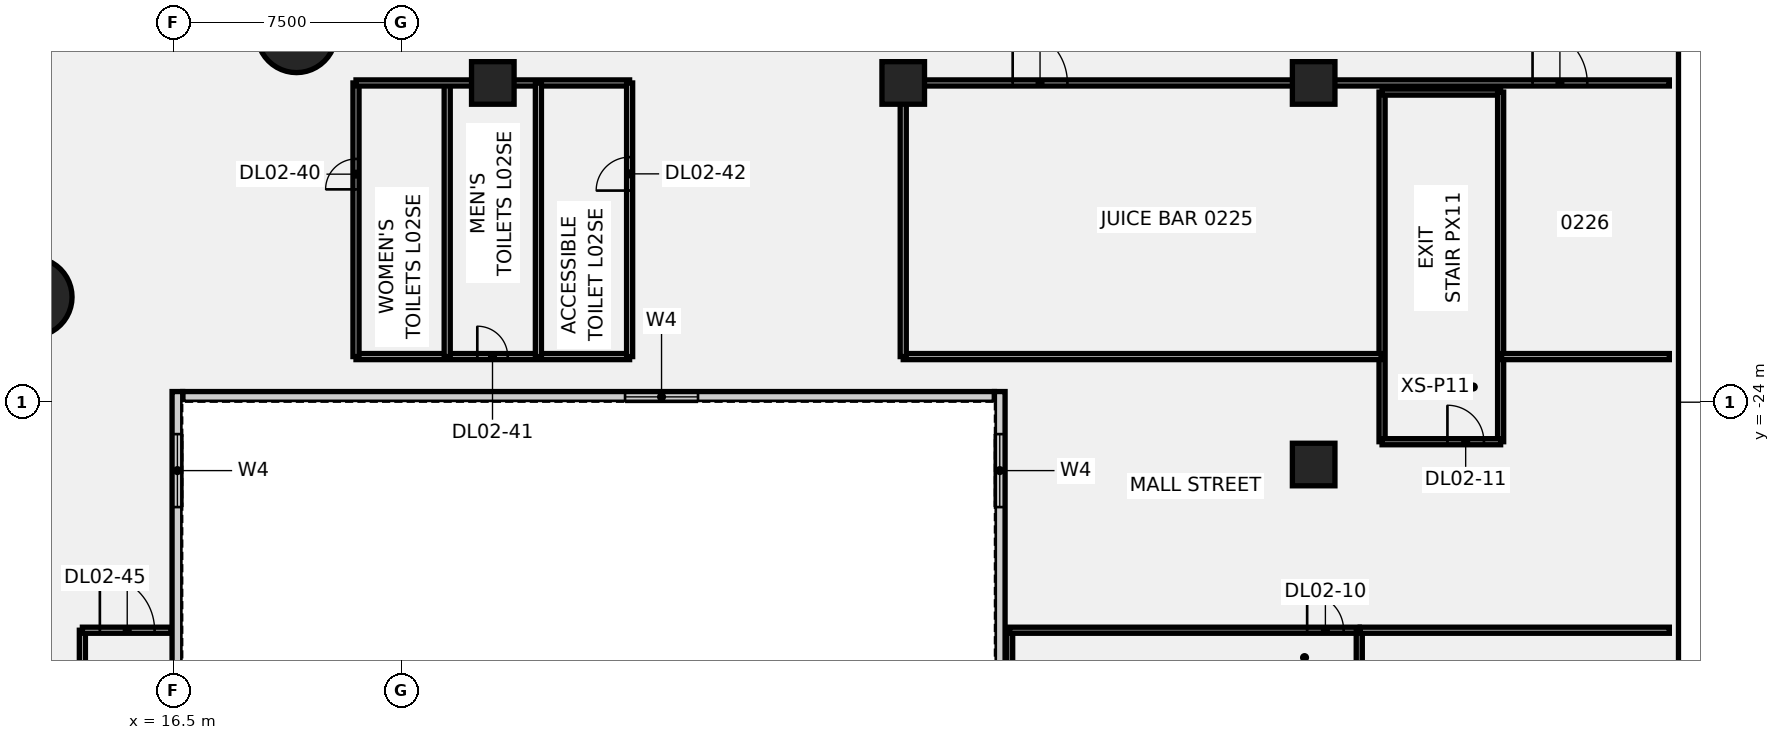
"""IFC4 building model, lengths in metres.
Left out: names, types, materials, properties, quantities, classifications, styles, units other than length and angle.
Written with IfcOpenShell. Run it as: python <this file> out.ifc"""

import sys

from ifc_helpers import new_model, si_unit, direction, frame, frame_2d, origin, origin_2d, place, context, subcontext, project, spatial, rectangle, circle, extrude, element, fill, save


model = new_model("IFC4")
c1 = context("Model", 3, precision=1e-05, world=origin(), true_north=direction((0.0, 1.0)))
c2 = subcontext(c1, "Body", "Model", "MODEL_VIEW")
j1 = project(units=[si_unit("LENGTHUNIT", "METRE"), si_unit("PLANEANGLEUNIT", "RADIAN")], contexts=[c1])
p1 = place(None, origin())
s1 = spatial("IfcSite", under=j1, at=p1, CompositionType="ELEMENT")
p2 = place(p1, origin())
s2 = spatial("IfcBuilding", under=s1, at=p2, CompositionType="ELEMENT")
p3 = place(p2, frame((0.0, 0.0, 15.0)))
s3 = spatial("IfcBuildingStorey", under=s2, at=p3, CompositionType="ELEMENT", Elevation=15.0)
for number, where, z_axis, x_axis in (
    (1, (11.86, -20.543, -0.5), (0.0, 0.0, 1.0), (1.0, 0.0, 0.0)),
    (2, (20.543, -11.86, -0.5), (0.0, 0.0, 1.0), (1.0, 0.0, 0.0)),
):
    element("IfcColumn", number, at=place(p3, frame(where, z_axis=z_axis, x_axis=x_axis)), inside=s3, PredefinedType="COLUMN", context=c2, shape_type="SweptSolid", body=[
        extrude(circle(Radius=1.3, at=origin_2d()), origin(), (0.0, 0.0, 1.0), 5.0),
    ])
for number, where, z_axis, x_axis in (
    (3, (27.0, -13.5, -0.5), (0.0, 0.0, 1.0), (1.0, 0.0, 0.0)),
    (4, (40.5, -13.5, -0.5), (0.0, 0.0, 1.0), (1.0, 0.0, 0.0)),
    (5, (54.0, -26.05, -0.5), (0.0, 0.0, 1.0), (1.0, 0.0, 0.0)),
    (6, (54.0, -13.5, -0.5), (0.0, 0.0, 1.0), (1.0, 0.0, 0.0)),
):
    element("IfcColumn", number, at=place(p3, frame(where, z_axis=z_axis, x_axis=x_axis)), inside=s3, PredefinedType="COLUMN", context=c2, shape_type="SweptSolid", body=[
        extrude(rectangle(XDim=1.4, YDim=1.4, at=origin_2d()), origin(), (0.0, 0.0, 1.0), 5.0),
    ])
p4 = place(p3, frame((44.0, -35.4, 0.0), z_axis=(0.0, 0.0, 1.0), x_axis=(0.0, 1.0, 0.0)))
e7 = element("IfcWall", 7, at=p4, inside=s3, PredefinedType="PARTITIONING", context=c2, shape_type="SweptSolid", body=[
    extrude(rectangle(XDim=3.9, YDim=0.2, at=frame_2d((1.95, 0.0))), origin(), (0.0, 0.0, 1.0), 4.5),
])
p5 = place(p3, frame((44.0, -31.5, 0.0), z_axis=(0.0, 0.0, 1.0), x_axis=(1.0, 0.0, 0.0)))
e8 = element("IfcWall", 8, at=p5, inside=s3, PredefinedType="PARTITIONING", context=c2, shape_type="SweptSolid", body=[
    extrude(rectangle(XDim=11.5, YDim=0.2, at=frame_2d((5.75, 0.0))), origin(), (0.0, 0.0, 1.0), 4.5),
])
p6 = place(p5, frame((9.786, 0.0, 0.0)))
e9 = element("IfcOpeningElement", 9, at=p6, cuts=e8, PredefinedType="OPENING", context=c2, shape_type="SweptSolid", body=[
    extrude(rectangle(XDim=1.2, YDim=2.1, at=frame_2d((0.6, 1.05))), frame((0.0, 0.11, 0.0), z_axis=(0.0, -1.0, 0.0), x_axis=(1.0, 0.0, 0.0)), (0.0, 0.0, 1.0), 0.22),
])
p7 = place(p3, frame((55.5, -35.4, 0.0), z_axis=(0.0, 0.0, 1.0), x_axis=(0.0, 1.0, 0.0)))
e10 = element("IfcWall", 10, at=p7, inside=s3, PredefinedType="PARTITIONING", context=c2, shape_type="SweptSolid", body=[
    extrude(rectangle(XDim=3.9, YDim=0.2, at=frame_2d((1.95, 0.0))), origin(), (0.0, 0.0, 1.0), 4.5),
])
p8 = place(p3, frame((56.25, -25.3, 0.0), z_axis=(0.0, 0.0, 1.0), x_axis=(0.0, 1.0, 0.0)))
e11 = element("IfcWall", 11, at=p8, inside=s3, PredefinedType="PARTITIONING", context=c2, shape_type="SweptSolid", body=[
    extrude(rectangle(XDim=11.5, YDim=0.2, at=frame_2d((5.75, 0.0))), origin(), (0.0, 0.0, 1.0), 4.5),
])
p9 = place(p3, frame((56.25, -13.8, 0.0), z_axis=(0.0, 0.0, 1.0), x_axis=(1.0, 0.0, 0.0)))
e12 = element("IfcWall", 12, at=p9, inside=s3, PredefinedType="PARTITIONING", context=c2, shape_type="SweptSolid", body=[
    extrude(rectangle(XDim=3.9, YDim=0.2, at=frame_2d((1.95, 0.0))), origin(), (0.0, 0.0, 1.0), 4.5),
])
p10 = place(p3, frame((60.15, -25.3, 0.0), z_axis=(0.0, 0.0, 1.0), x_axis=(0.0, 1.0, 0.0)))
e13 = element("IfcWall", 13, at=p10, inside=s3, PredefinedType="PARTITIONING", context=c2, shape_type="SweptSolid", body=[
    extrude(rectangle(XDim=11.5, YDim=0.2, at=frame_2d((5.75, 0.0))), origin(), (0.0, 0.0, 1.0), 4.5),
])
p11 = place(p3, frame((56.25, -25.3, 0.0), z_axis=(0.0, 0.0, 1.0), x_axis=(1.0, 0.0, 0.0)))
e14 = element("IfcWall", 14, at=p11, inside=s3, PredefinedType="PARTITIONING", context=c2, shape_type="SweptSolid", body=[
    extrude(rectangle(XDim=3.9, YDim=0.2, at=frame_2d((1.95, 0.0))), origin(), (0.0, 0.0, 1.0), 4.5),
])
p12 = place(p11, frame((2.15, 0.0, 0.0)))
e15 = element("IfcOpeningElement", 15, at=p12, cuts=e14, PredefinedType="OPENING", context=c2, shape_type="SweptSolid", body=[
    extrude(rectangle(XDim=1.2, YDim=2.1, at=frame_2d((0.6, 1.05))), frame((0.0, 0.11, 0.0), z_axis=(0.0, -1.0, 0.0), x_axis=(1.0, 0.0, 0.0)), (0.0, 0.0, 1.0), 0.22),
])
p13 = place(p3, frame((13.5, -34.22, 0.0), z_axis=(0.0, 0.0, 1.0), x_axis=(0.0, 1.0, 0.0)))
e16 = element("IfcWall", 16, at=p13, inside=s3, PredefinedType="PARTITIONING", context=c2, shape_type="SweptSolid", body=[
    extrude(rectangle(XDim=2.72, YDim=0.2, at=frame_2d((1.36, 0.0))), origin(), (0.0, 0.0, 1.0), 4.5),
])
p14 = place(p3, frame((13.5, -31.5, 0.0), z_axis=(0.0, 0.0, 1.0), x_axis=(1.0, 0.0, 0.0)))
e17 = element("IfcWall", 17, at=p14, inside=s3, PredefinedType="PARTITIONING", context=c2, shape_type="SweptSolid", body=[
    extrude(rectangle(XDim=2.92, YDim=0.2, at=frame_2d((1.46, 0.0))), origin(), (0.0, 0.0, 1.0), 4.5),
])
p15 = place(p14, frame((0.575, 0.0, 0.0)))
e18 = element("IfcOpeningElement", 18, at=p15, cuts=e17, PredefinedType="OPENING", context=c2, shape_type="SweptSolid", body=[
    extrude(rectangle(XDim=1.8, YDim=2.1, at=frame_2d((0.9, 1.05))), frame((0.0, 0.11, 0.0), z_axis=(0.0, -1.0, 0.0), x_axis=(1.0, 0.0, 0.0)), (0.0, 0.0, 1.0), 0.22),
])
p16 = place(p3, frame((22.5, -22.5, 0.0), z_axis=(0.0, 0.0, 1.0), x_axis=(1.0, 0.0, 0.0)))
e19 = element("IfcWall", 19, at=p16, inside=s3, PredefinedType="PARTITIONING", context=c2, shape_type="SweptSolid", body=[
    extrude(rectangle(XDim=9.0, YDim=0.2, at=frame_2d((4.5, 0.0))), origin(), (0.0, 0.0, 1.0), 4.5),
])
p17 = place(p16, frame((3.99, 0.0, 0.0)))
e20 = element("IfcOpeningElement", 20, at=p17, cuts=e19, PredefinedType="OPENING", context=c2, shape_type="SweptSolid", body=[
    extrude(rectangle(XDim=1.0, YDim=2.1, at=frame_2d((0.5, 1.05))), frame((0.0, 0.11, 0.0), z_axis=(0.0, -1.0, 0.0), x_axis=(1.0, 0.0, 0.0)), (0.0, 0.0, 1.0), 0.22),
])
p18 = place(p3, frame((25.5, -22.5, 0.0), z_axis=(0.0, 0.0, 1.0), x_axis=(0.0, 1.0, 0.0)))
e21 = element("IfcWall", 21, at=p18, inside=s3, PredefinedType="PARTITIONING", context=c2, shape_type="SweptSolid", body=[
    extrude(rectangle(XDim=9.0, YDim=0.2, at=frame_2d((4.5, 0.0))), origin(), (0.0, 0.0, 1.0), 4.5),
])
p19 = place(p3, frame((22.5, -22.5, 0.0), z_axis=(0.0, 0.0, 1.0), x_axis=(0.0, 1.0, 0.0)))
e22 = element("IfcWall", 22, at=p19, inside=s3, PredefinedType="PARTITIONING", context=c2, shape_type="SweptSolid", body=[
    extrude(rectangle(XDim=9.0, YDim=0.2, at=frame_2d((4.5, 0.0))), origin(), (0.0, 0.0, 1.0), 4.5),
])
p20 = place(p19, frame((5.5, 0.0, 0.0)))
e23 = element("IfcOpeningElement", 23, at=p20, cuts=e22, PredefinedType="OPENING", context=c2, shape_type="SweptSolid", body=[
    extrude(rectangle(XDim=1.0, YDim=2.1, at=frame_2d((0.5, 1.05))), frame((0.0, 0.11, 0.0), z_axis=(0.0, -1.0, 0.0), x_axis=(1.0, 0.0, 0.0)), (0.0, 0.0, 1.0), 0.22),
])
p21 = place(p3, frame((22.5, -13.5, 0.0), z_axis=(0.0, 0.0, 1.0), x_axis=(1.0, 0.0, 0.0)))
e24 = element("IfcWall", 24, at=p21, inside=s3, PredefinedType="PARTITIONING", context=c2, shape_type="SweptSolid", body=[
    extrude(rectangle(XDim=9.0, YDim=0.2, at=frame_2d((4.5, 0.0))), origin(), (0.0, 0.0, 1.0), 4.5),
])
p22 = place(p3, frame((31.5, -22.5, 0.0), z_axis=(0.0, 0.0, 1.0), x_axis=(0.0, 1.0, 0.0)))
e25 = element("IfcWall", 25, at=p22, inside=s3, PredefinedType="PARTITIONING", context=c2, shape_type="SweptSolid", body=[
    extrude(rectangle(XDim=9.0, YDim=0.2, at=frame_2d((4.5, 0.0))), origin(), (0.0, 0.0, 1.0), 4.5),
])
p23 = place(p22, frame((5.46, 0.0, 0.0)))
e26 = element("IfcOpeningElement", 26, at=p23, cuts=e25, PredefinedType="OPENING", context=c2, shape_type="SweptSolid", body=[
    extrude(rectangle(XDim=1.1, YDim=2.1, at=frame_2d((0.55, 1.05))), frame((0.0, 0.11, 0.0), z_axis=(0.0, -1.0, 0.0), x_axis=(1.0, 0.0, 0.0)), (0.0, 0.0, 1.0), 0.22),
])
p24 = place(p3, frame((28.5, -22.5, 0.0), z_axis=(0.0, 0.0, 1.0), x_axis=(0.0, 1.0, 0.0)))
e27 = element("IfcWall", 27, at=p24, inside=s3, PredefinedType="PARTITIONING", context=c2, shape_type="SweptSolid", body=[
    extrude(rectangle(XDim=9.0, YDim=0.2, at=frame_2d((4.5, 0.0))), origin(), (0.0, 0.0, 1.0), 4.5),
])
p25 = place(p3, frame((55.53, -31.5, 0.0), z_axis=(0.0, 0.0, 1.0), x_axis=(1.0, 0.0, 0.0)))
e28 = element("IfcWall", 28, at=p25, inside=s3, PredefinedType="PARTITIONING", context=c2, shape_type="SweptSolid", body=[
    extrude(rectangle(XDim=10.169, YDim=0.2, at=frame_2d((5.084, 0.0))), origin(), (0.0, 0.0, 1.0), 4.5),
])
p26 = place(p3, frame((40.5, -22.5, 0.0), z_axis=(0.0, 0.0, 1.0), x_axis=(1.0, 0.0, 0.0)))
e29 = element("IfcWall", 29, at=p26, inside=s3, PredefinedType="PARTITIONING", context=c2, shape_type="SweptSolid", body=[
    extrude(rectangle(XDim=15.72, YDim=0.2, at=frame_2d((7.86, 0.0))), origin(), (0.0, 0.0, 1.0), 4.5),
])
p27 = place(p3, frame((40.5, -22.5, 0.0), z_axis=(0.0, 0.0, 1.0), x_axis=(0.0, 1.0, 0.0)))
e30 = element("IfcWall", 30, at=p27, inside=s3, PredefinedType="PARTITIONING", context=c2, shape_type="SweptSolid", body=[
    extrude(rectangle(XDim=9.0, YDim=0.2, at=frame_2d((4.5, 0.0))), origin(), (0.0, 0.0, 1.0), 4.5),
])
p28 = place(p3, frame((40.5, -13.5, 0.0), z_axis=(0.0, 0.0, 1.0), x_axis=(1.0, 0.0, 0.0)))
e31 = element("IfcWall", 31, at=p28, inside=s3, PredefinedType="PARTITIONING", context=c2, shape_type="SweptSolid", body=[
    extrude(rectangle(XDim=25.199, YDim=0.2, at=frame_2d((12.6, 0.0))), origin(), (0.0, 0.0, 1.0), 4.5),
])
p29 = place(p28, frame((3.6, 0.0, 0.0)))
e32 = element("IfcOpeningElement", 32, at=p29, cuts=e31, PredefinedType="OPENING", context=c2, shape_type="SweptSolid", body=[
    extrude(rectangle(XDim=1.8, YDim=2.1, at=frame_2d((0.9, 1.05))), frame((0.0, 0.11, 0.0), z_axis=(0.0, -1.0, 0.0), x_axis=(1.0, 0.0, 0.0)), (0.0, 0.0, 1.0), 0.22),
])
p30 = place(p28, frame((20.7, 0.0, 0.0)))
e33 = element("IfcOpeningElement", 33, at=p30, cuts=e31, PredefinedType="OPENING", context=c2, shape_type="SweptSolid", body=[
    extrude(rectangle(XDim=1.8, YDim=2.1, at=frame_2d((0.9, 1.05))), frame((0.0, 0.11, 0.0), z_axis=(0.0, -1.0, 0.0), x_axis=(1.0, 0.0, 0.0)), (0.0, 0.0, 1.0), 0.22),
])
p31 = place(p3, frame((60.18, -22.5, 0.0), z_axis=(0.0, 0.0, 1.0), x_axis=(1.0, 0.0, 0.0)))
e34 = element("IfcWall", 34, at=p31, inside=s3, PredefinedType="PARTITIONING", context=c2, shape_type="SweptSolid", body=[
    extrude(rectangle(XDim=5.519, YDim=0.2, at=frame_2d((2.76, 0.0))), origin(), (0.0, 0.0, 1.0), 4.5),
])
p32 = place(p3, frame((16.8, -23.825, 0.0), z_axis=(0.0, 0.0, 1.0), x_axis=(1.0, 0.0, 0.0)))
e35 = element("IfcWall", 35, at=p32, inside=s3, PredefinedType="SOLIDWALL", context=c2, shape_type="SweptSolid", body=[
    extrude(rectangle(XDim=26.7, YDim=0.35, at=frame_2d((13.35, 0.0))), origin(), (0.0, 0.0, 1.0), 4.5),
])
p33 = place(p32, frame((14.55, 0.0, 1.0)))
e36 = element("IfcOpeningElement", 36, at=p33, cuts=e35, PredefinedType="OPENING", context=c2, shape_type="SweptSolid", body=[
    extrude(rectangle(XDim=2.4, YDim=1.8, at=frame_2d((1.2, 0.9))), frame((0.0, 0.185, 0.0), z_axis=(0.0, -1.0, 0.0), x_axis=(1.0, 0.0, 0.0)), (0.0, 0.0, 1.0), 0.37),
])
p34 = place(p3, frame((16.625, -42.35, 0.0), z_axis=(0.0, 0.0, 1.0), x_axis=(0.0, 1.0, 0.0)))
e37 = element("IfcWall", 37, at=p34, inside=s3, PredefinedType="SOLIDWALL", context=c2, shape_type="SweptSolid", body=[
    extrude(rectangle(XDim=18.7, YDim=0.35, at=frame_2d((9.35, 0.0))), origin(), (0.0, 0.0, 1.0), 4.5),
])
p35 = place(p34, frame((14.9, 0.0, 1.0)))
e38 = element("IfcOpeningElement", 38, at=p35, cuts=e37, PredefinedType="OPENING", context=c2, shape_type="SweptSolid", body=[
    extrude(rectangle(XDim=2.4, YDim=1.8, at=frame_2d((1.2, 0.9))), frame((0.0, 0.185, 0.0), z_axis=(0.0, -1.0, 0.0), x_axis=(1.0, 0.0, 0.0)), (0.0, 0.0, 1.0), 0.37),
])
p36 = place(p3, frame((43.675, -42.35, 0.0), z_axis=(0.0, 0.0, 1.0), x_axis=(0.0, 1.0, 0.0)))
e39 = element("IfcWall", 39, at=p36, inside=s3, PredefinedType="SOLIDWALL", context=c2, shape_type="SweptSolid", body=[
    extrude(rectangle(XDim=18.7, YDim=0.35, at=frame_2d((9.35, 0.0))), origin(), (0.0, 0.0, 1.0), 4.5),
])
p37 = place(p36, frame((14.9, 0.0, 1.0)))
e40 = element("IfcOpeningElement", 40, at=p37, cuts=e39, PredefinedType="OPENING", context=c2, shape_type="SweptSolid", body=[
    extrude(rectangle(XDim=2.4, YDim=1.8, at=frame_2d((1.2, 0.9))), frame((0.0, 0.185, 0.0), z_axis=(0.0, -1.0, 0.0), x_axis=(1.0, 0.0, 0.0)), (0.0, 0.0, 1.0), 0.37),
])
p38 = place(p6, origin())
e41 = element("IfcDoor", 41, at=p38, inside=s3, OperationType="SINGLE_SWING_RIGHT", PredefinedType="DOOR", context=c2, shape_type="SweptSolid", body=[
    extrude(rectangle(XDim=1.2, YDim=2.1, at=frame_2d((0.6, 1.05))), frame((0.0, 0.025, 0.0), z_axis=(0.0, -1.0, 0.0), x_axis=(1.0, 0.0, 0.0)), (0.0, 0.0, 1.0), 0.05),
])
fill(e9, e41)
p39 = place(p12, origin())
e42 = element("IfcDoor", 42, at=p39, inside=s3, OperationType="SINGLE_SWING_LEFT", PredefinedType="DOOR", context=c2, shape_type="SweptSolid", body=[
    extrude(rectangle(XDim=1.2, YDim=2.1, at=frame_2d((0.6, 1.05))), frame((0.0, 0.025, 0.0), z_axis=(0.0, -1.0, 0.0), x_axis=(1.0, 0.0, 0.0)), (0.0, 0.0, 1.0), 0.05),
])
fill(e15, e42)
p40 = place(p20, origin())
e43 = element("IfcDoor", 43, at=p40, inside=s3, OperationType="SINGLE_SWING_RIGHT", PredefinedType="DOOR", context=c2, shape_type="SweptSolid", body=[
    extrude(rectangle(XDim=1.0, YDim=2.1, at=frame_2d((0.5, 1.05))), frame((0.0, 0.025, 0.0), z_axis=(0.0, -1.0, 0.0), x_axis=(1.0, 0.0, 0.0)), (0.0, 0.0, 1.0), 0.05),
])
fill(e23, e43)
p41 = place(p17, origin())
e44 = element("IfcDoor", 44, at=p41, inside=s3, OperationType="SINGLE_SWING_LEFT", PredefinedType="DOOR", context=c2, shape_type="SweptSolid", body=[
    extrude(rectangle(XDim=1.0, YDim=2.1, at=frame_2d((0.5, 1.05))), frame((0.0, 0.025, 0.0), z_axis=(0.0, -1.0, 0.0), x_axis=(1.0, 0.0, 0.0)), (0.0, 0.0, 1.0), 0.05),
])
fill(e20, e44)
p42 = place(p23, origin())
e45 = element("IfcDoor", 45, at=p42, inside=s3, OperationType="SINGLE_SWING_RIGHT", PredefinedType="DOOR", context=c2, shape_type="SweptSolid", body=[
    extrude(rectangle(XDim=1.1, YDim=2.1, at=frame_2d((0.55, 1.05))), frame((0.0, 0.025, 0.0), z_axis=(0.0, -1.0, 0.0), x_axis=(1.0, 0.0, 0.0)), (0.0, 0.0, 1.0), 0.05),
])
fill(e26, e45)
p43 = place(p29, origin())
e46 = element("IfcDoor", 46, at=p43, inside=s3, OperationType="SINGLE_SWING_LEFT", PredefinedType="DOOR", context=c2, shape_type="SweptSolid", body=[
    extrude(rectangle(XDim=1.8, YDim=2.1, at=frame_2d((0.9, 1.05))), frame((0.0, 0.025, 0.0), z_axis=(0.0, -1.0, 0.0), x_axis=(1.0, 0.0, 0.0)), (0.0, 0.0, 1.0), 0.05),
])
fill(e32, e46)
p44 = place(p30, origin())
e47 = element("IfcDoor", 47, at=p44, inside=s3, OperationType="SINGLE_SWING_RIGHT", PredefinedType="DOOR", context=c2, shape_type="SweptSolid", body=[
    extrude(rectangle(XDim=1.8, YDim=2.1, at=frame_2d((0.9, 1.05))), frame((0.0, 0.025, 0.0), z_axis=(0.0, -1.0, 0.0), x_axis=(1.0, 0.0, 0.0)), (0.0, 0.0, 1.0), 0.05),
])
fill(e33, e47)
p45 = place(p15, origin())
e48 = element("IfcDoor", 48, at=p45, inside=s3, OperationType="SINGLE_SWING_LEFT", PredefinedType="DOOR", context=c2, shape_type="SweptSolid", body=[
    extrude(rectangle(XDim=1.8, YDim=2.1, at=frame_2d((0.9, 1.05))), frame((0.0, 0.025, 0.0), z_axis=(0.0, -1.0, 0.0), x_axis=(1.0, 0.0, 0.0)), (0.0, 0.0, 1.0), 0.05),
])
fill(e18, e48)
p46 = place(p33, origin())
e49 = element("IfcWindow", 49, at=p46, inside=s3, PartitioningType="SINGLE_PANEL", PredefinedType="WINDOW", context=c2, shape_type="SweptSolid", body=[
    extrude(rectangle(XDim=2.4, YDim=1.8, at=frame_2d((1.2, 0.9))), frame((0.0, 0.03, 0.0), z_axis=(0.0, -1.0, 0.0), x_axis=(1.0, 0.0, 0.0)), (0.0, 0.0, 1.0), 0.06),
])
fill(e36, e49)
p47 = place(p35, origin())
e50 = element("IfcWindow", 50, at=p47, inside=s3, PartitioningType="SINGLE_PANEL", PredefinedType="WINDOW", context=c2, shape_type="SweptSolid", body=[
    extrude(rectangle(XDim=2.4, YDim=1.8, at=frame_2d((1.2, 0.9))), frame((0.0, 0.03, 0.0), z_axis=(0.0, -1.0, 0.0), x_axis=(1.0, 0.0, 0.0)), (0.0, 0.0, 1.0), 0.06),
])
fill(e38, e50)
p48 = place(p37, origin())
e51 = element("IfcWindow", 51, at=p48, inside=s3, PartitioningType="SINGLE_PANEL", PredefinedType="WINDOW", context=c2, shape_type="SweptSolid", body=[
    extrude(rectangle(XDim=2.4, YDim=1.8, at=frame_2d((1.2, 0.9))), frame((0.0, 0.03, 0.0), z_axis=(0.0, -1.0, 0.0), x_axis=(1.0, 0.0, 0.0)), (0.0, 0.0, 1.0), 0.06),
])
fill(e40, e51)
save(model, sys.argv[1])
